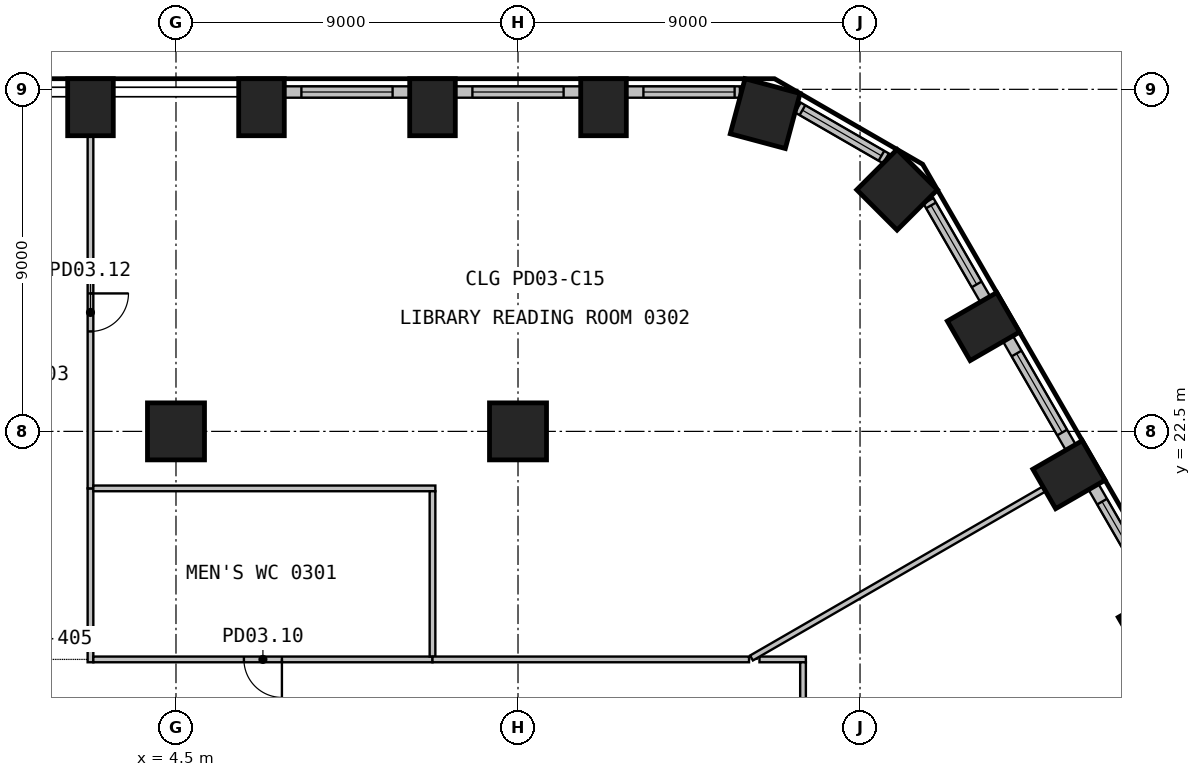
"""IFC4 building model, lengths in metres.
Left out: names, types, materials, properties, quantities, classifications, styles, units other than length and angle.
Written with IfcOpenShell. Run it as: python <this file> out.ifc"""

import sys

from ifc_helpers import new_model, si_unit, direction, frame, frame_2d, origin, origin_2d, place, context, subcontext, project, spatial, rectangle, circle, extrude, element, fill, save


model = new_model("IFC4")
c1 = context("Model", 3, precision=1e-05, world=origin(), true_north=direction((0.0, 1.0)))
c2 = subcontext(c1, "Body", "Model", "MODEL_VIEW")
j1 = project(units=[si_unit("LENGTHUNIT", "METRE"), si_unit("PLANEANGLEUNIT", "RADIAN")], contexts=[c1])
p1 = place(None, origin())
s1 = spatial("IfcSite", under=j1, at=p1, CompositionType="ELEMENT")
p2 = place(p1, origin())
s2 = spatial("IfcBuilding", under=s1, at=p2, CompositionType="ELEMENT")
p3 = place(p2, frame((0.0, 0.0, 15.6)))
s3 = spatial("IfcBuildingStorey", under=s2, at=p3, CompositionType="ELEMENT", Elevation=15.6)
for number, where, z_axis, x_axis in (
    (1, (30.248, 17.463, 0.0), (0.0, 0.0, 1.0), (-0.5, 0.866, 0.0)),
    (2, (27.998, 21.361, 0.0), (0.0, 0.0, 1.0), (-0.5, 0.866, 0.0)),
    (3, (25.748, 25.258, 0.0), (0.0, 0.0, 1.0), (-0.5, 0.866, 0.0)),
):
    element("IfcColumn", number, at=place(p3, frame(where, z_axis=z_axis, x_axis=x_axis)), inside=s3, PredefinedType="COLUMN", context=c2, shape_type="SweptSolid", body=[
        extrude(rectangle(XDim=1.2, YDim=1.5, at=origin_2d()), origin(), (0.0, 0.0, 1.0), 4.4),
    ])
for number, where, z_axis, x_axis in (
    (4, (23.475, 28.857, 0.0), (0.0, 0.0, 1.0), (-0.707, 0.707, 0.0)),
    (5, (20.004, 30.861, 0.0), (0.0, 0.0, 1.0), (-0.966, 0.259, 0.0)),
):
    element("IfcColumn", number, at=place(p3, frame(where, z_axis=z_axis, x_axis=x_axis)), inside=s3, PredefinedType="COLUMN", context=c2, shape_type="SweptSolid", body=[
        extrude(rectangle(XDim=1.5, YDim=1.5, at=origin_2d()), origin(), (0.0, 0.0, 1.0), 4.4),
    ])
for number, where, z_axis, x_axis in (
    (6, (15.75, 31.03, 0.0), (0.0, 0.0, 1.0), (-1.0, 0.0, 0.0)),
    (7, (11.25, 31.03, 0.0), (0.0, 0.0, 1.0), (-1.0, 0.0, 0.0)),
    (8, (6.75, 31.03, 0.0), (0.0, 0.0, 1.0), (-1.0, 0.0, 0.0)),
    (9, (2.25, 31.03, 0.0), (0.0, 0.0, 1.0), (-1.0, 0.0, 0.0)),
):
    element("IfcColumn", number, at=place(p3, frame(where, z_axis=z_axis, x_axis=x_axis)), inside=s3, PredefinedType="COLUMN", context=c2, shape_type="SweptSolid", body=[
        extrude(rectangle(XDim=1.2, YDim=1.5, at=origin_2d()), origin(), (0.0, 0.0, 1.0), 4.4),
    ])
for number, where, z_axis, x_axis in (
    (10, (4.5, 22.5, 0.0), (0.0, 0.0, 1.0), (1.0, 0.0, 0.0)),
    (11, (13.5, 22.5, 0.0), (0.0, 0.0, 1.0), (1.0, 0.0, 0.0)),
):
    element("IfcColumn", number, at=place(p3, frame(where, z_axis=z_axis, x_axis=x_axis)), inside=s3, PredefinedType="COLUMN", context=c2, shape_type="SweptSolid", body=[
        extrude(circle(Radius=0.75, at=origin_2d()), origin(), (0.0, 0.0, 1.0), 4.4),
    ])
p4 = place(p3, frame((30.294, 18.184, 0.0), z_axis=(0.0, 0.0, 1.0), x_axis=(-0.499991515992, 0.866030301974, 0.0)))
e12 = element("IfcWall", 12, at=p4, inside=s3, PredefinedType="SOLIDWALL", context=c2, shape_type="SweptSolid", body=[
    extrude(rectangle(XDim=3.299, YDim=0.3, at=frame_2d((1.649, 0.0))), origin(), (0.0, 0.0, 1.0), 4.4),
])
p5 = place(p4, frame((0.449, 0.0, 0.9)))
e13 = element("IfcOpeningElement", 13, at=p5, cuts=e12, PredefinedType="OPENING", context=c2, shape_type="SweptSolid", body=[
    extrude(rectangle(XDim=2.4, YDim=3.0, at=frame_2d((1.2, 1.5))), frame((0.0, 0.16, 0.0), z_axis=(0.0, -1.0, 0.0), x_axis=(1.0, 0.0, 0.0)), (0.0, 0.0, 1.0), 0.32),
])
p6 = place(p3, frame((28.044, 22.081, 0.0), z_axis=(0.0, 0.0, 1.0), x_axis=(-0.499991515992, 0.866030301974, 0.0)))
e14 = element("IfcWall", 14, at=p6, inside=s3, PredefinedType="SOLIDWALL", context=c2, shape_type="SweptSolid", body=[
    extrude(rectangle(XDim=3.299, YDim=0.3, at=frame_2d((1.649, 0.0))), origin(), (0.0, 0.0, 1.0), 4.4),
])
p7 = place(p6, frame((0.449, 0.0, 0.9)))
e15 = element("IfcOpeningElement", 15, at=p7, cuts=e14, PredefinedType="OPENING", context=c2, shape_type="SweptSolid", body=[
    extrude(rectangle(XDim=2.4, YDim=3.0, at=frame_2d((1.2, 1.5))), frame((0.0, 0.16, 0.0), z_axis=(0.0, -1.0, 0.0), x_axis=(1.0, 0.0, 0.0)), (0.0, 0.0, 1.0), 0.32),
])
p8 = place(p3, frame((25.794, 25.978, 0.0), z_axis=(0.0, 0.0, 1.0), x_axis=(-0.49999586137, 0.866027793211, 0.0)))
e16 = element("IfcWall", 16, at=p8, inside=s3, PredefinedType="SOLIDWALL", context=c2, shape_type="SweptSolid", body=[
    extrude(rectangle(XDim=2.989, YDim=0.3, at=frame_2d((1.494, 0.0))), origin(), (0.0, 0.0, 1.0), 4.4),
])
p9 = place(p8, frame((0.449, 0.0, 0.9)))
e17 = element("IfcOpeningElement", 17, at=p9, cuts=e16, PredefinedType="OPENING", context=c2, shape_type="SweptSolid", body=[
    extrude(rectangle(XDim=2.4, YDim=3.0, at=frame_2d((1.2, 1.5))), frame((0.0, 0.16, 0.0), z_axis=(0.0, -1.0, 0.0), x_axis=(1.0, 0.0, 0.0)), (0.0, 0.0, 1.0), 0.32),
])
p10 = place(p3, frame((23.183, 29.682, 0.0), z_axis=(0.0, 0.0, 1.0), x_axis=(-0.866001915448, 0.500040680786, 0.0)))
e18 = element("IfcWall", 18, at=p10, inside=s3, PredefinedType="SOLIDWALL", context=c2, shape_type="SweptSolid", body=[
    extrude(rectangle(XDim=2.678, YDim=0.3, at=frame_2d((1.339, 0.0))), origin(), (0.0, 0.0, 1.0), 4.4),
])
p11 = place(p10, frame((0.139, 0.0, 0.9)))
e19 = element("IfcOpeningElement", 19, at=p11, cuts=e18, PredefinedType="OPENING", context=c2, shape_type="SweptSolid", body=[
    extrude(rectangle(XDim=2.4, YDim=3.0, at=frame_2d((1.2, 1.5))), frame((0.0, 0.16, 0.0), z_axis=(0.0, -1.0, 0.0), x_axis=(1.0, 0.0, 0.0)), (0.0, 0.0, 1.0), 0.32),
])
p12 = place(p3, frame((19.339, 31.43, 0.0), z_axis=(0.0, 0.0, 1.0), x_axis=(-1.0, 0.0, 0.0)))
e20 = element("IfcWall", 20, at=p12, inside=s3, PredefinedType="SOLIDWALL", context=c2, shape_type="SweptSolid", body=[
    extrude(rectangle(XDim=2.989, YDim=0.3, at=frame_2d((1.494, 0.0))), origin(), (0.0, 0.0, 1.0), 4.4),
])
p13 = place(p12, frame((0.139, 0.0, 0.9)))
e21 = element("IfcOpeningElement", 21, at=p13, cuts=e20, PredefinedType="OPENING", context=c2, shape_type="SweptSolid", body=[
    extrude(rectangle(XDim=2.4, YDim=3.0, at=frame_2d((1.2, 1.5))), frame((0.0, 0.16, 0.0), z_axis=(0.0, -1.0, 0.0), x_axis=(1.0, 0.0, 0.0)), (0.0, 0.0, 1.0), 0.32),
])
p14 = place(p3, frame((15.149, 31.43, 0.0), z_axis=(0.0, 0.0, 1.0), x_axis=(-1.0, 0.0, 0.0)))
e22 = element("IfcWall", 22, at=p14, inside=s3, PredefinedType="SOLIDWALL", context=c2, shape_type="SweptSolid", body=[
    extrude(rectangle(XDim=3.299, YDim=0.3, at=frame_2d((1.649, 0.0))), origin(), (0.0, 0.0, 1.0), 4.4),
])
p15 = place(p14, frame((0.449, 0.0, 0.9)))
e23 = element("IfcOpeningElement", 23, at=p15, cuts=e22, PredefinedType="OPENING", context=c2, shape_type="SweptSolid", body=[
    extrude(rectangle(XDim=2.4, YDim=3.0, at=frame_2d((1.2, 1.5))), frame((0.0, 0.16, 0.0), z_axis=(0.0, -1.0, 0.0), x_axis=(1.0, 0.0, 0.0)), (0.0, 0.0, 1.0), 0.32),
])
p16 = place(p3, frame((10.649, 31.43, 0.0), z_axis=(0.0, 0.0, 1.0), x_axis=(-1.0, 0.0, 0.0)))
e24 = element("IfcWall", 24, at=p16, inside=s3, PredefinedType="SOLIDWALL", context=c2, shape_type="SweptSolid", body=[
    extrude(rectangle(XDim=3.299, YDim=0.3, at=frame_2d((1.649, 0.0))), origin(), (0.0, 0.0, 1.0), 4.4),
])
p17 = place(p16, frame((0.449, 0.0, 0.9)))
e25 = element("IfcOpeningElement", 25, at=p17, cuts=e24, PredefinedType="OPENING", context=c2, shape_type="SweptSolid", body=[
    extrude(rectangle(XDim=2.4, YDim=3.0, at=frame_2d((1.2, 1.5))), frame((0.0, 0.16, 0.0), z_axis=(0.0, -1.0, 0.0), x_axis=(1.0, 0.0, 0.0)), (0.0, 0.0, 1.0), 0.32),
])
p18 = place(p3, frame((2.25, 21.0, 0.0), z_axis=(0.0, 0.0, 1.0), x_axis=(0.0, -1.0, 0.0)))
e26 = element("IfcWall", 26, at=p18, inside=s3, PredefinedType="PARTITIONING", context=c2, shape_type="SweptSolid", body=[
    extrude(rectangle(XDim=4.575, YDim=0.15, at=frame_2d((2.288, 0.0))), origin(), (0.0, 0.0, 1.0), 4.4),
])
p19 = place(p3, frame((11.25, 16.5, 0.0), z_axis=(0.0, 0.0, 1.0), x_axis=(-1.0, 0.0, 0.0)))
e27 = element("IfcWall", 27, at=p19, inside=s3, PredefinedType="PARTITIONING", context=c2, shape_type="SweptSolid", body=[
    extrude(rectangle(XDim=8.925, YDim=0.15, at=frame_2d((4.462, 0.0))), origin(), (0.0, 0.0, 1.0), 4.4),
])
p20 = place(p19, frame((3.962, 0.0, 0.0)))
e28 = element("IfcOpeningElement", 28, at=p20, cuts=e27, PredefinedType="OPENING", context=c2, shape_type="SweptSolid", body=[
    extrude(rectangle(XDim=1.0, YDim=2.1, at=frame_2d((0.5, 1.05))), frame((0.0, 0.085, 0.0), z_axis=(0.0, -1.0, 0.0), x_axis=(1.0, 0.0, 0.0)), (0.0, 0.0, 1.0), 0.17),
])
p21 = place(p3, frame((2.25, 30.26, 0.0), z_axis=(0.0, 0.0, 1.0), x_axis=(0.0, -1.0, 0.0)))
e29 = element("IfcWall", 29, at=p21, inside=s3, PredefinedType="PARTITIONING", context=c2, shape_type="SweptSolid", body=[
    extrude(rectangle(XDim=9.26, YDim=0.15, at=frame_2d((4.63, 0.0))), origin(), (0.0, 0.0, 1.0), 4.4),
])
p22 = place(p21, frame((4.13, 0.0, 0.0)))
e30 = element("IfcOpeningElement", 30, at=p22, cuts=e29, PredefinedType="OPENING", context=c2, shape_type="SweptSolid", body=[
    extrude(rectangle(XDim=1.0, YDim=2.1, at=frame_2d((0.5, 1.05))), frame((0.0, 0.085, 0.0), z_axis=(0.0, -1.0, 0.0), x_axis=(1.0, 0.0, 0.0)), (0.0, 0.0, 1.0), 0.17),
])
p23 = place(p3, frame((2.325, 21.0, 0.0), z_axis=(0.0, 0.0, 1.0), x_axis=(1.0, 0.0, 0.0)))
e31 = element("IfcWall", 31, at=p23, inside=s3, PredefinedType="PARTITIONING", context=c2, shape_type="SweptSolid", body=[
    extrude(rectangle(XDim=9.0, YDim=0.15, at=frame_2d((4.5, 0.0))), origin(), (0.0, 0.0, 1.0), 4.4),
])
p24 = place(p3, frame((11.25, 20.925, 0.0), z_axis=(0.0, 0.0, 1.0), x_axis=(0.0, -1.0, 0.0)))
e32 = element("IfcWall", 32, at=p24, inside=s3, PredefinedType="PARTITIONING", context=c2, shape_type="SweptSolid", body=[
    extrude(rectangle(XDim=4.35, YDim=0.15, at=frame_2d((2.175, 0.0))), origin(), (0.0, 0.0, 1.0), 4.4),
])
p25 = place(p3, frame((19.579, 16.5, 0.0), z_axis=(0.0, 0.0, 1.0), x_axis=(-1.0, 0.0, 0.0)))
e33 = element("IfcWall", 33, at=p25, inside=s3, PredefinedType="PARTITIONING", context=c2, shape_type="SweptSolid", body=[
    extrude(rectangle(XDim=8.329, YDim=0.15, at=frame_2d((4.165, 0.0))), origin(), (0.0, 0.0, 1.0), 4.4),
])
p26 = place(p3, frame((21.075, 16.5, 0.0), z_axis=(0.0, 0.0, 1.0), x_axis=(-1.0, 0.0, 0.0)))
e34 = element("IfcWall", 34, at=p26, inside=s3, PredefinedType="PARTITIONING", context=c2, shape_type="SweptSolid", body=[
    extrude(rectangle(XDim=1.221, YDim=0.15, at=frame_2d((0.61, 0.0))), origin(), (0.0, 0.0, 1.0), 4.4),
])
p27 = place(p3, frame((27.331, 20.976, 0.0), z_axis=(0.0, 0.0, 1.0), x_axis=(-0.866000072607, -0.50004387232, 0.0)))
e35 = element("IfcWall", 35, at=p27, inside=s3, PredefinedType="PARTITIONING", context=c2, shape_type="SweptSolid", body=[
    extrude(rectangle(XDim=8.876, YDim=0.15, at=frame_2d((4.438, 0.0))), origin(), (0.0, 0.0, 1.0), 4.4),
])
p28 = place(p3, frame((21.0, 2.175, 0.0), z_axis=(0.0, 0.0, 1.0), x_axis=(0.0, 1.0, 0.0)))
e36 = element("IfcWall", 36, at=p28, inside=s3, PredefinedType="PARTITIONING", context=c2, shape_type="SweptSolid", body=[
    extrude(rectangle(XDim=14.25, YDim=0.15, at=frame_2d((7.125, 0.0))), origin(), (0.0, 0.0, 1.0), 4.4),
])
p29 = place(p28, frame((6.625, 0.0, 0.0)))
e37 = element("IfcOpeningElement", 37, at=p29, cuts=e36, PredefinedType="OPENING", context=c2, shape_type="SweptSolid", body=[
    extrude(rectangle(XDim=1.0, YDim=2.1, at=frame_2d((0.5, 1.05))), frame((0.0, 0.085, 0.0), z_axis=(0.0, -1.0, 0.0), x_axis=(1.0, 0.0, 0.0)), (0.0, 0.0, 1.0), 0.17),
])
p30 = place(p5, origin())
e38 = element("IfcWindow", 38, at=p30, inside=s3, PartitioningType="SINGLE_PANEL", PredefinedType="WINDOW", context=c2, shape_type="SweptSolid", body=[
    extrude(rectangle(XDim=2.4, YDim=3.0, at=frame_2d((1.2, 1.5))), frame((0.0, 0.03, 0.0), z_axis=(0.0, -1.0, 0.0), x_axis=(1.0, 0.0, 0.0)), (0.0, 0.0, 1.0), 0.06),
])
fill(e13, e38)
p31 = place(p7, origin())
e39 = element("IfcWindow", 39, at=p31, inside=s3, PartitioningType="SINGLE_PANEL", PredefinedType="WINDOW", context=c2, shape_type="SweptSolid", body=[
    extrude(rectangle(XDim=2.4, YDim=3.0, at=frame_2d((1.2, 1.5))), frame((0.0, 0.03, 0.0), z_axis=(0.0, -1.0, 0.0), x_axis=(1.0, 0.0, 0.0)), (0.0, 0.0, 1.0), 0.06),
])
fill(e15, e39)
p32 = place(p9, origin())
e40 = element("IfcWindow", 40, at=p32, inside=s3, PartitioningType="SINGLE_PANEL", PredefinedType="WINDOW", context=c2, shape_type="SweptSolid", body=[
    extrude(rectangle(XDim=2.4, YDim=3.0, at=frame_2d((1.2, 1.5))), frame((0.0, 0.03, 0.0), z_axis=(0.0, -1.0, 0.0), x_axis=(1.0, 0.0, 0.0)), (0.0, 0.0, 1.0), 0.06),
])
fill(e17, e40)
p33 = place(p11, origin())
e41 = element("IfcWindow", 41, at=p33, inside=s3, PartitioningType="SINGLE_PANEL", PredefinedType="WINDOW", context=c2, shape_type="SweptSolid", body=[
    extrude(rectangle(XDim=2.4, YDim=3.0, at=frame_2d((1.2, 1.5))), frame((0.0, 0.03, 0.0), z_axis=(0.0, -1.0, 0.0), x_axis=(1.0, 0.0, 0.0)), (0.0, 0.0, 1.0), 0.06),
])
fill(e19, e41)
p34 = place(p13, origin())
e42 = element("IfcWindow", 42, at=p34, inside=s3, PartitioningType="SINGLE_PANEL", PredefinedType="WINDOW", context=c2, shape_type="SweptSolid", body=[
    extrude(rectangle(XDim=2.4, YDim=3.0, at=frame_2d((1.2, 1.5))), frame((0.0, 0.03, 0.0), z_axis=(0.0, -1.0, 0.0), x_axis=(1.0, 0.0, 0.0)), (0.0, 0.0, 1.0), 0.06),
])
fill(e21, e42)
p35 = place(p15, origin())
e43 = element("IfcWindow", 43, at=p35, inside=s3, PartitioningType="SINGLE_PANEL", PredefinedType="WINDOW", context=c2, shape_type="SweptSolid", body=[
    extrude(rectangle(XDim=2.4, YDim=3.0, at=frame_2d((1.2, 1.5))), frame((0.0, 0.03, 0.0), z_axis=(0.0, -1.0, 0.0), x_axis=(1.0, 0.0, 0.0)), (0.0, 0.0, 1.0), 0.06),
])
fill(e23, e43)
p36 = place(p17, origin())
e44 = element("IfcWindow", 44, at=p36, inside=s3, PartitioningType="SINGLE_PANEL", PredefinedType="WINDOW", context=c2, shape_type="SweptSolid", body=[
    extrude(rectangle(XDim=2.4, YDim=3.0, at=frame_2d((1.2, 1.5))), frame((0.0, 0.03, 0.0), z_axis=(0.0, -1.0, 0.0), x_axis=(1.0, 0.0, 0.0)), (0.0, 0.0, 1.0), 0.06),
])
fill(e25, e44)
p37 = place(p20, origin())
e45 = element("IfcDoor", 45, at=p37, inside=s3, OperationType="SINGLE_SWING_RIGHT", PredefinedType="DOOR", context=c2, shape_type="SweptSolid", body=[
    extrude(rectangle(XDim=1.0, YDim=2.1, at=frame_2d((0.5, 1.05))), frame((0.0, 0.025, 0.0), z_axis=(0.0, -1.0, 0.0), x_axis=(1.0, 0.0, 0.0)), (0.0, 0.0, 1.0), 0.05),
])
fill(e28, e45)
p38 = place(p22, origin())
e46 = element("IfcDoor", 46, at=p38, inside=s3, OperationType="SINGLE_SWING_LEFT", PredefinedType="DOOR", context=c2, shape_type="SweptSolid", body=[
    extrude(rectangle(XDim=1.0, YDim=2.1, at=frame_2d((0.5, 1.05))), frame((0.0, 0.025, 0.0), z_axis=(0.0, -1.0, 0.0), x_axis=(1.0, 0.0, 0.0)), (0.0, 0.0, 1.0), 0.05),
])
fill(e30, e46)
save(model, sys.argv[1])
